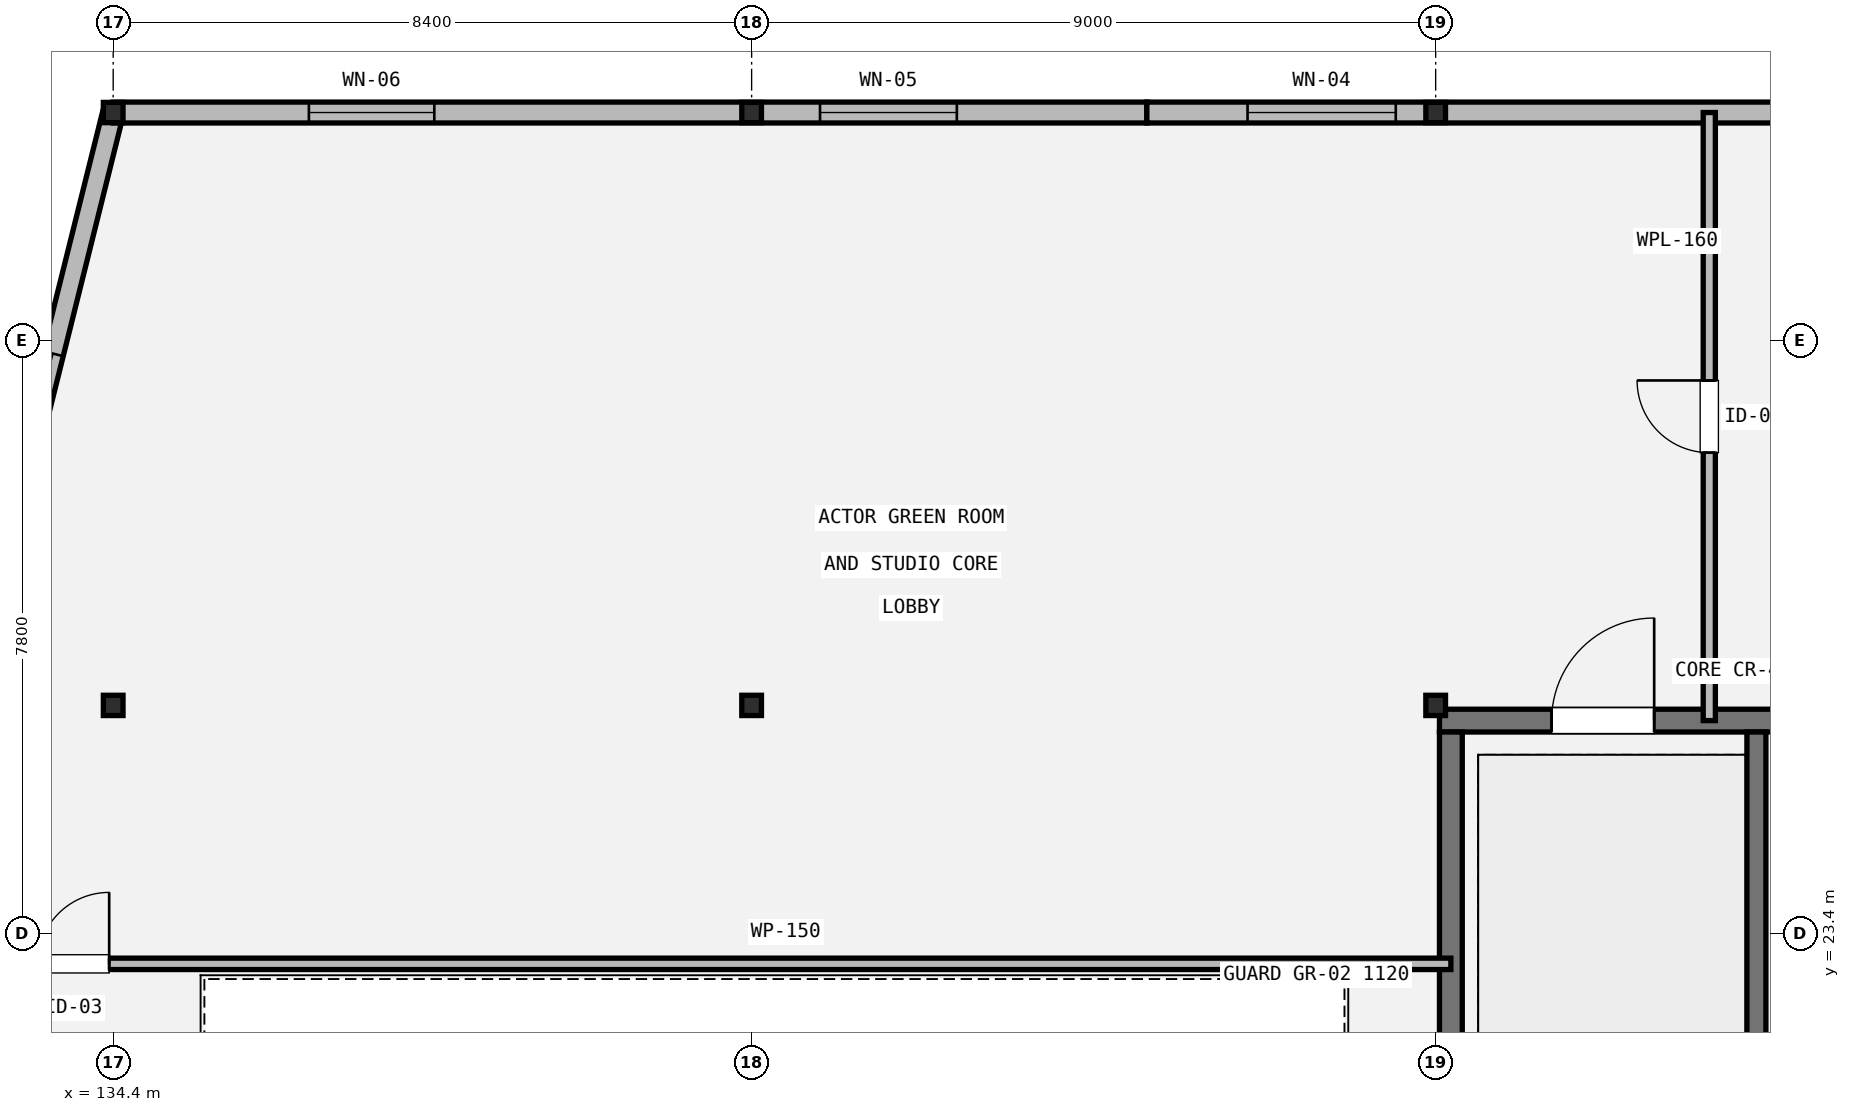
"""IFC4 building model, lengths in metres.
Left out: names, types, materials, properties, quantities, classifications, styles, units other than length and angle.
Written with IfcOpenShell. Run it as: python <this file> out.ifc"""

import sys

from ifc_helpers import new_model, si_unit, direction, frame, frame_2d, origin, origin_2d, place, context, subcontext, project, spatial, rectangle, i_section, extrude, element, fill, save


model = new_model("IFC4")
c1 = context("Model", 3, precision=1e-05, world=origin(), true_north=direction((0.0, 1.0)))
c2 = subcontext(c1, "Body", "Model", "MODEL_VIEW")
j1 = project(units=[si_unit("LENGTHUNIT", "METRE"), si_unit("PLANEANGLEUNIT", "RADIAN")], contexts=[c1])
p1 = place(None, origin())
s1 = spatial("IfcSite", under=j1, at=p1, CompositionType="ELEMENT")
p2 = place(p1, origin())
s2 = spatial("IfcBuilding", under=s1, at=p2, CompositionType="ELEMENT")
p3 = place(p2, frame((0.0, 0.0, 5.4)))
s3 = spatial("IfcBuildingStorey", under=s2, at=p3, CompositionType="ELEMENT", Elevation=5.4)
for number, where, z_axis, x_axis in (
    (1, (134.4, 26.4, 0.0), (0.0, 0.0, 1.0), (1.0, 0.0, 0.0)),
    (2, (134.4, 34.2, 0.0), (0.0, 0.0, 1.0), (1.0, 0.0, 0.0)),
    (3, (142.8, 26.4, 0.0), (0.0, 0.0, 1.0), (1.0, 0.0, 0.0)),
    (4, (142.8, 34.2, 0.0), (0.0, 0.0, 1.0), (1.0, 0.0, 0.0)),
    (5, (151.8, 26.4, 0.0), (0.0, 0.0, 1.0), (1.0, 0.0, 0.0)),
    (6, (151.8, 34.2, 0.0), (0.0, 0.0, 1.0), (1.0, 0.0, 0.0)),
):
    element("IfcColumn", number, at=place(p3, frame(where, z_axis=z_axis, x_axis=x_axis)), inside=s3, PredefinedType="COLUMN", context=c2, shape_type="SweptSolid", body=[
        extrude(i_section(OverallWidth=0.259, OverallDepth=0.267, WebThickness=0.013, FlangeThickness=0.021, FilletRadius=0.013, at=origin_2d()), origin(), (0.0, 0.0, 1.0), 4.8),
    ])
p4 = place(p3, frame((130.51, 18.6, 0.0), z_axis=(0.0, 0.0, 1.0), x_axis=(0.241917443673, 0.970296836255, 0.0)))
e7 = element("IfcWall", 7, at=p4, inside=s3, PredefinedType="STANDARD", context=c2, shape_type="SweptSolid", body=[
    extrude(rectangle(XDim=16.077, YDim=0.275, at=frame_2d((8.039, 0.0))), origin(), (0.0, 0.0, 1.0), 3.955),
])
p5 = place(p4, frame((1.994, 0.0, 0.9)))
e8 = element("IfcOpeningElement", 8, at=p5, cuts=e7, PredefinedType="OPENING", context=c2, shape_type="SweptSolid", body=[
    extrude(rectangle(XDim=1.35, YDim=1.8, at=frame_2d((0.675, 0.9))), frame((0.0, 0.147, 0.0), z_axis=(0.0, -1.0, 0.0), x_axis=(1.0, 0.0, 0.0)), (0.0, 0.0, 1.0), 0.295),
])
p6 = place(p4, frame((11.308, 0.0, 0.9)))
e9 = element("IfcOpeningElement", 9, at=p6, cuts=e7, PredefinedType="OPENING", context=c2, shape_type="SweptSolid", body=[
    extrude(rectangle(XDim=1.5, YDim=1.8, at=frame_2d((0.75, 0.9))), frame((0.0, 0.147, 0.0), z_axis=(0.0, -1.0, 0.0), x_axis=(1.0, 0.0, 0.0)), (0.0, 0.0, 1.0), 0.295),
])
p7 = place(p3, frame((134.4, 34.2, 0.0), z_axis=(0.0, 0.0, 1.0), x_axis=(1.0, 0.0, 0.0)))
e10 = element("IfcWall", 10, at=p7, inside=s3, PredefinedType="STANDARD", context=c2, shape_type="SweptSolid", body=[
    extrude(rectangle(XDim=13.6, YDim=0.275, at=frame_2d((6.8, 0.0))), origin(), (0.0, 0.0, 1.0), 3.889),
])
p8 = place(p7, frame((2.575, 0.0, 0.9)))
e11 = element("IfcOpeningElement", 11, at=p8, cuts=e10, PredefinedType="OPENING", context=c2, shape_type="SweptSolid", body=[
    extrude(rectangle(XDim=1.65, YDim=1.8, at=frame_2d((0.825, 0.9))), frame((0.0, 0.147, 0.0), z_axis=(0.0, -1.0, 0.0), x_axis=(1.0, 0.0, 0.0)), (0.0, 0.0, 1.0), 0.295),
])
p9 = place(p7, frame((9.3, 0.0, 0.9)))
e12 = element("IfcOpeningElement", 12, at=p9, cuts=e10, PredefinedType="OPENING", context=c2, shape_type="SweptSolid", body=[
    extrude(rectangle(XDim=1.8, YDim=1.8, at=frame_2d((0.9, 0.9))), frame((0.0, 0.147, 0.0), z_axis=(0.0, -1.0, 0.0), x_axis=(1.0, 0.0, 0.0)), (0.0, 0.0, 1.0), 0.295),
])
p10 = place(p3, frame((148.0, 34.2, 0.0), z_axis=(0.0, 0.0, 1.0), x_axis=(1.0, 0.0, 0.0)))
e13 = element("IfcWall", 13, at=p10, inside=s3, PredefinedType="STANDARD", context=c2, shape_type="SweptSolid", body=[
    extrude(rectangle(XDim=12.8, YDim=0.275, at=frame_2d((6.4, 0.0))), origin(), (0.0, 0.0, 1.0), 3.889),
])
p11 = place(p10, frame((1.325, 0.0, 0.9)))
e14 = element("IfcOpeningElement", 14, at=p11, cuts=e13, PredefinedType="OPENING", context=c2, shape_type="SweptSolid", body=[
    extrude(rectangle(XDim=1.95, YDim=1.8, at=frame_2d((0.975, 0.9))), frame((0.0, 0.147, 0.0), z_axis=(0.0, -1.0, 0.0), x_axis=(1.0, 0.0, 0.0)), (0.0, 0.0, 1.0), 0.295),
])
p12 = place(p10, frame((8.55, 0.0, 0.9)))
e15 = element("IfcOpeningElement", 15, at=p12, cuts=e13, PredefinedType="OPENING", context=c2, shape_type="SweptSolid", body=[
    extrude(rectangle(XDim=2.1, YDim=1.8, at=frame_2d((1.05, 0.9))), frame((0.0, 0.147, 0.0), z_axis=(0.0, -1.0, 0.0), x_axis=(1.0, 0.0, 0.0)), (0.0, 0.0, 1.0), 0.295),
])
p13 = place(p3, frame((151.85, 26.2, 0.0), z_axis=(0.0, 0.0, 1.0), x_axis=(1.0, 0.0, 0.0)))
e16 = element("IfcWall", 16, at=p13, inside=s3, PredefinedType="SHEAR", context=c2, shape_type="SweptSolid", body=[
    extrude(rectangle(XDim=8.95, YDim=0.3, at=frame_2d((4.475, 0.0))), origin(), (0.0, 0.0, 1.0), 4.58),
])
p14 = place(p13, frame((1.475, 0.0, 0.0)))
e17 = element("IfcOpeningElement", 17, at=p14, cuts=e16, PredefinedType="OPENING", context=c2, shape_type="SweptSolid", body=[
    extrude(rectangle(XDim=1.35, YDim=2.15, at=frame_2d((0.675, 1.075))), frame((0.0, 0.16, 0.0), z_axis=(0.0, -1.0, 0.0), x_axis=(1.0, 0.0, 0.0)), (0.0, 0.0, 1.0), 0.32),
])
p15 = place(p3, frame((152.0, 15.75, 0.0), z_axis=(0.0, 0.0, 1.0), x_axis=(0.0, 1.0, 0.0)))
e18 = element("IfcWall", 18, at=p15, inside=s3, PredefinedType="SHEAR", context=c2, shape_type="SweptSolid", body=[
    extrude(rectangle(XDim=10.3, YDim=0.3, at=frame_2d((5.15, 0.0))), origin(), (0.0, 0.0, 1.0), 4.58),
])
p16 = place(p3, frame((156.02, 26.05, 0.0), z_axis=(0.0, 0.0, 1.0), x_axis=(0.0, -1.0, 0.0)))
e19 = element("IfcWall", 19, at=p16, inside=s3, PredefinedType="SHEAR", context=c2, shape_type="SweptSolid", body=[
    extrude(rectangle(XDim=10.3, YDim=0.25, at=frame_2d((5.15, 0.0))), origin(), (0.0, 0.0, 1.0), 4.58),
])
p17 = place(p16, frame((8.65, 0.0, 0.0)))
e20 = element("IfcOpeningElement", 20, at=p17, cuts=e19, PredefinedType="OPENING", context=c2, shape_type="SweptSolid", body=[
    extrude(rectangle(XDim=1.1, YDim=2.15, at=frame_2d((0.55, 1.075))), frame((0.0, 0.135, 0.0), z_axis=(0.0, -1.0, 0.0), x_axis=(1.0, 0.0, 0.0)), (0.0, 0.0, 1.0), 0.27),
])
p18 = place(p3, frame((131.0, 23.0, 0.0), z_axis=(0.0, 0.0, 1.0), x_axis=(1.0, 0.0, 0.0)))
e21 = element("IfcWall", 21, at=p18, inside=s3, PredefinedType="PARTITIONING", context=c2, shape_type="SweptSolid", body=[
    extrude(rectangle(XDim=21.0, YDim=0.15, at=frame_2d((10.5, 0.0))), origin(), (0.0, 0.0, 1.0), 3.955),
])
p19 = place(p18, frame((2.407, 0.0, 0.0)))
e22 = element("IfcOpeningElement", 22, at=p19, cuts=e21, PredefinedType="OPENING", context=c2, shape_type="SweptSolid", body=[
    extrude(rectangle(XDim=0.94, YDim=2.1, at=frame_2d((0.47, 1.05))), frame((0.0, 0.085, 0.0), z_axis=(0.0, -1.0, 0.0), x_axis=(1.0, 0.0, 0.0)), (0.0, 0.0, 1.0), 0.17),
])
p20 = place(p3, frame((155.4, 26.2, 0.0), z_axis=(0.0, 0.0, 1.0), x_axis=(0.0, 1.0, 0.0)))
e23 = element("IfcWall", 23, at=p20, inside=s3, PredefinedType="PLUMBINGWALL", context=c2, shape_type="SweptSolid", body=[
    extrude(rectangle(XDim=8.0, YDim=0.16, at=frame_2d((4.0, 0.0))), origin(), (0.0, 0.0, 1.0), 3.889),
])
p21 = place(p20, frame((3.525, 0.0, 0.0)))
e24 = element("IfcOpeningElement", 24, at=p21, cuts=e23, PredefinedType="OPENING", context=c2, shape_type="SweptSolid", body=[
    extrude(rectangle(XDim=0.95, YDim=2.1, at=frame_2d((0.475, 1.05))), frame((0.0, 0.09, 0.0), z_axis=(0.0, -1.0, 0.0), x_axis=(1.0, 0.0, 0.0)), (0.0, 0.0, 1.0), 0.18),
])
p22 = place(p6, origin())
e25 = element("IfcWindow", 25, at=p22, inside=s3, PartitioningType="SINGLE_PANEL", PredefinedType="WINDOW", context=c2, shape_type="SweptSolid", body=[
    extrude(rectangle(XDim=1.5, YDim=1.8, at=frame_2d((0.75, 0.9))), frame((0.0, 0.03, 0.0), z_axis=(0.0, -1.0, 0.0), x_axis=(1.0, 0.0, 0.0)), (0.0, 0.0, 1.0), 0.06),
])
fill(e9, e25)
p23 = place(p8, origin())
e26 = element("IfcWindow", 26, at=p23, inside=s3, PartitioningType="SINGLE_PANEL", PredefinedType="WINDOW", context=c2, shape_type="SweptSolid", body=[
    extrude(rectangle(XDim=1.65, YDim=1.8, at=frame_2d((0.825, 0.9))), frame((0.0, 0.03, 0.0), z_axis=(0.0, -1.0, 0.0), x_axis=(1.0, 0.0, 0.0)), (0.0, 0.0, 1.0), 0.06),
])
fill(e11, e26)
p24 = place(p9, origin())
e27 = element("IfcWindow", 27, at=p24, inside=s3, PartitioningType="SINGLE_PANEL", PredefinedType="WINDOW", context=c2, shape_type="SweptSolid", body=[
    extrude(rectangle(XDim=1.8, YDim=1.8, at=frame_2d((0.9, 0.9))), frame((0.0, 0.03, 0.0), z_axis=(0.0, -1.0, 0.0), x_axis=(1.0, 0.0, 0.0)), (0.0, 0.0, 1.0), 0.06),
])
fill(e12, e27)
p25 = place(p11, origin())
e28 = element("IfcWindow", 28, at=p25, inside=s3, PartitioningType="SINGLE_PANEL", PredefinedType="WINDOW", context=c2, shape_type="SweptSolid", body=[
    extrude(rectangle(XDim=1.95, YDim=1.8, at=frame_2d((0.975, 0.9))), frame((0.0, 0.03, 0.0), z_axis=(0.0, -1.0, 0.0), x_axis=(1.0, 0.0, 0.0)), (0.0, 0.0, 1.0), 0.06),
])
fill(e14, e28)
p26 = place(p14, origin())
e29 = element("IfcDoor", 29, at=p26, inside=s3, OperationType="SINGLE_SWING_RIGHT", PredefinedType="DOOR", context=c2, shape_type="SweptSolid", body=[
    extrude(rectangle(XDim=1.35, YDim=2.15, at=frame_2d((0.675, 1.075))), frame((0.0, 0.025, 0.0), z_axis=(0.0, -1.0, 0.0), x_axis=(1.0, 0.0, 0.0)), (0.0, 0.0, 1.0), 0.05),
])
fill(e17, e29)
p27 = place(p19, origin())
e30 = element("IfcDoor", 30, at=p27, inside=s3, OperationType="SINGLE_SWING_RIGHT", PredefinedType="DOOR", context=c2, shape_type="SweptSolid", body=[
    extrude(rectangle(XDim=0.94, YDim=2.1, at=frame_2d((0.47, 1.05))), frame((0.0, 0.025, 0.0), z_axis=(0.0, -1.0, 0.0), x_axis=(1.0, 0.0, 0.0)), (0.0, 0.0, 1.0), 0.05),
])
fill(e22, e30)
p28 = place(p21, origin())
e31 = element("IfcDoor", 31, at=p28, inside=s3, OperationType="SINGLE_SWING_RIGHT", PredefinedType="DOOR", context=c2, shape_type="SweptSolid", body=[
    extrude(rectangle(XDim=0.95, YDim=2.1, at=frame_2d((0.475, 1.05))), frame((0.0, 0.025, 0.0), z_axis=(0.0, -1.0, 0.0), x_axis=(1.0, 0.0, 0.0)), (0.0, 0.0, 1.0), 0.05),
])
fill(e24, e31)
save(model, sys.argv[1])
